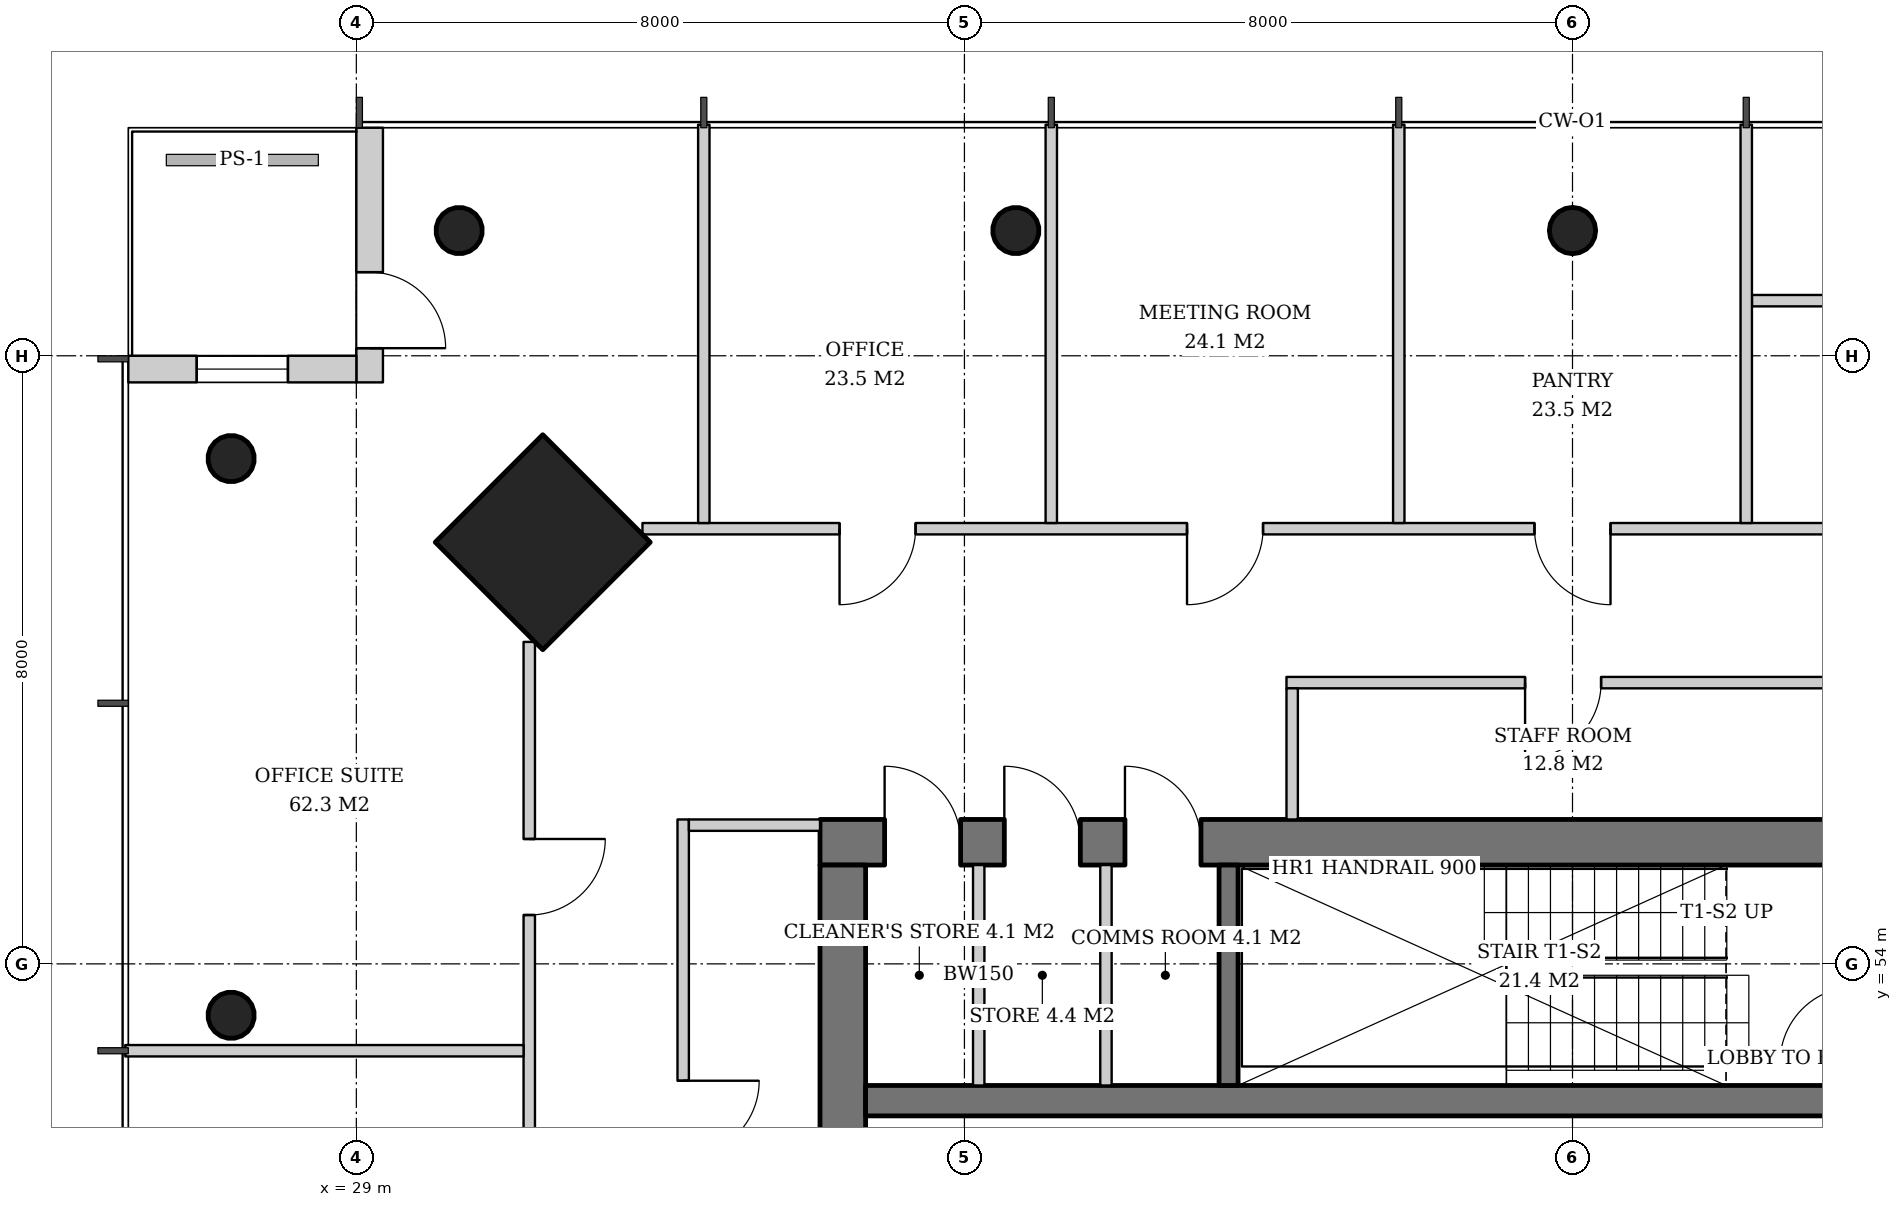
"""IFC4 building model, lengths in metres.
Left out: names, types, materials, properties, quantities, classifications, styles, units other than length and angle.
Written with IfcOpenShell. Run it as: python <this file> out.ifc"""

import sys

from ifc_helpers import new_model, si_unit, direction, frame, frame_2d, origin, origin_2d, place, context, subcontext, project, spatial, rectangle, hollow_circle, extrude, element, fill, save


model = new_model("IFC4")
c1 = context("Model", 3, precision=1e-05, world=origin(), true_north=direction((0.0, 1.0)))
c2 = subcontext(c1, "Body", "Model", "MODEL_VIEW")
j1 = project(units=[si_unit("LENGTHUNIT", "METRE"), si_unit("PLANEANGLEUNIT", "RADIAN")], contexts=[c1])
p1 = place(None, origin())
s1 = spatial("IfcSite", under=j1, at=p1, CompositionType="ELEMENT")
p2 = place(p1, origin())
s2 = spatial("IfcBuilding", under=s1, at=p2, CompositionType="ELEMENT")
p3 = place(p2, frame((0.0, 0.0, 218.6)))
s3 = spatial("IfcBuildingStorey", under=s2, at=p3, CompositionType="ELEMENT", Elevation=218.6)
p4 = place(p3, frame((31.414, 59.586, 0.0), z_axis=(0.031900153262, -0.031900153262, 0.998981861919), x_axis=(0.707106781187, 0.707106781187, 0.0)))
e1 = element("IfcColumn", 1, at=p4, inside=s3, PredefinedType="COLUMN", context=c2, shape_type="SweptSolid", body=[
    extrude(rectangle(XDim=2.0, YDim=2.0, at=origin_2d()), origin(), (0.0, 0.0, 1.0), 3.804),
])
p5 = place(p3, frame((30.314, 63.686, 0.0), z_axis=(0.031964207655, -0.031964207655, 0.998977766949), x_axis=(0.707106781187, 0.707106781187, 0.0)))
e2 = element("IfcColumn", 2, at=p5, inside=s3, PredefinedType="COLUMN", context=c2, shape_type="SweptSolid", body=[
    extrude(hollow_circle(Radius=0.305, WallThickness=0.025, at=origin_2d()), origin(), (0.0, 0.0, 1.0), 3.804),
])
p6 = place(p3, frame((45.0, 63.686, 0.0), z_axis=(0.0, -0.031980549263, 0.999488491414), x_axis=(1.0, 0.0, 0.0)))
e3 = element("IfcColumn", 3, at=p6, inside=s3, PredefinedType="COLUMN", context=c2, shape_type="SweptSolid", body=[
    extrude(hollow_circle(Radius=0.305, WallThickness=0.025, at=origin_2d()), origin(), (0.0, 0.0, 1.0), 3.802),
])
p7 = place(p3, frame((37.657, 63.686, 0.0), z_axis=(0.015924037308, -0.031976494272, 0.99936176075), x_axis=(0.895145027055, 0.445775033553, 0.0)))
e4 = element("IfcColumn", 4, at=p7, inside=s3, PredefinedType="COLUMN", context=c2, shape_type="SweptSolid", body=[
    extrude(hollow_circle(Radius=0.305, WallThickness=0.025, at=origin_2d()), origin(), (0.0, 0.0, 1.0), 3.802),
])
p8 = place(p3, frame((27.314, 60.686, 0.0), z_axis=(0.031964207655, -0.031964207655, 0.998977766949), x_axis=(0.707106781187, 0.707106781187, 0.0)))
e5 = element("IfcColumn", 5, at=p8, inside=s3, PredefinedType="COLUMN", context=c2, shape_type="SweptSolid", body=[
    extrude(hollow_circle(Radius=0.305, WallThickness=0.025, at=origin_2d()), origin(), (0.0, 0.0, 1.0), 3.804),
])
p9 = place(p3, frame((27.314, 53.343, 0.0), z_axis=(0.031976494272, -0.015924037308, 0.99936176075), x_axis=(0.445775033553, 0.895145027055, 0.0)))
e6 = element("IfcColumn", 6, at=p9, inside=s3, PredefinedType="COLUMN", context=c2, shape_type="SweptSolid", body=[
    extrude(hollow_circle(Radius=0.305, WallThickness=0.025, at=origin_2d()), origin(), (0.0, 0.0, 1.0), 3.802),
])
p10 = place(p3, frame((35.1, 55.6, 0.0), z_axis=(0.0, 0.0, 1.0), x_axis=(1.0, 0.0, 0.0)))
e7 = element("IfcWall", 7, at=p10, inside=s3, PredefinedType="SHEAR", context=c2, shape_type="SweptSolid", body=[
    extrude(rectangle(XDim=19.8, YDim=0.6, at=frame_2d((9.9, 0.0))), origin(), (0.0, 0.0, 1.0), 3.8),
])
p11 = place(p10, frame((14.54, 0.0, 0.0)))
e8 = element("IfcOpeningElement", 8, at=p11, cuts=e7, PredefinedType="OPENING", context=c2, shape_type="SweptSolid", body=[
    extrude(rectangle(XDim=1.0, YDim=2.1, at=frame_2d((0.5, 1.05))), frame((0.0, 0.31, 0.0), z_axis=(0.0, -1.0, 0.0), x_axis=(1.0, 0.0, 0.0)), (0.0, 0.0, 1.0), 0.62),
])
p12 = place(p10, frame((0.85, 0.0, 0.0)))
e9 = element("IfcOpeningElement", 9, at=p12, cuts=e7, PredefinedType="OPENING", context=c2, shape_type="SweptSolid", body=[
    extrude(rectangle(XDim=1.0, YDim=2.1, at=frame_2d((0.5, 1.05))), frame((0.0, 0.31, 0.0), z_axis=(0.0, -1.0, 0.0), x_axis=(1.0, 0.0, 0.0)), (0.0, 0.0, 1.0), 0.62),
])
p13 = place(p10, frame((2.425, 0.0, 0.0)))
e10 = element("IfcOpeningElement", 10, at=p13, cuts=e7, PredefinedType="OPENING", context=c2, shape_type="SweptSolid", body=[
    extrude(rectangle(XDim=1.0, YDim=2.1, at=frame_2d((0.5, 1.05))), frame((0.0, 0.31, 0.0), z_axis=(0.0, -1.0, 0.0), x_axis=(1.0, 0.0, 0.0)), (0.0, 0.0, 1.0), 0.62),
])
p14 = place(p10, frame((4.012, 0.0, 0.0)))
e11 = element("IfcOpeningElement", 11, at=p14, cuts=e7, PredefinedType="OPENING", context=c2, shape_type="SweptSolid", body=[
    extrude(rectangle(XDim=1.0, YDim=2.1, at=frame_2d((0.5, 1.05))), frame((0.0, 0.31, 0.0), z_axis=(0.0, -1.0, 0.0), x_axis=(1.0, 0.0, 0.0)), (0.0, 0.0, 1.0), 0.62),
])
p15 = place(p3, frame((35.4, 36.7, 0.0), z_axis=(0.0, 0.0, 1.0), x_axis=(0.0, 1.0, 0.0)))
e12 = element("IfcWall", 12, at=p15, inside=s3, PredefinedType="SHEAR", context=c2, shape_type="SweptSolid", body=[
    extrude(rectangle(XDim=18.6, YDim=0.6, at=frame_2d((9.3, 0.0))), origin(), (0.0, 0.0, 1.0), 3.8),
])
p16 = place(p15, frame((8.4, 0.0, 0.0)))
e13 = element("IfcOpeningElement", 13, at=p16, cuts=e12, PredefinedType="OPENING", context=c2, shape_type="SweptSolid", body=[
    extrude(rectangle(XDim=1.8, YDim=2.4, at=frame_2d((0.9, 1.2))), frame((0.0, 0.31, 0.0), z_axis=(0.0, -1.0, 0.0), x_axis=(1.0, 0.0, 0.0)), (0.0, 0.0, 1.0), 0.62),
])
p17 = place(p3, frame((35.7, 52.2, 0.0), z_axis=(0.0, 0.0, 1.0), x_axis=(1.0, 0.0, 0.0)))
e14 = element("IfcWall", 14, at=p17, inside=s3, PredefinedType="SHEAR", context=c2, shape_type="SweptSolid", body=[
    extrude(rectangle(XDim=18.6, YDim=0.4, at=frame_2d((9.3, 0.0))), origin(), (0.0, 0.0, 1.0), 3.8),
])
p18 = place(p3, frame((29.175, 65.0, 0.0), z_axis=(0.0, 0.0, 1.0), x_axis=(0.0, -1.0, 0.0)))
e15 = element("IfcWall", 15, at=p18, inside=s3, PredefinedType="SOLIDWALL", context=c2, shape_type="SweptSolid", body=[
    extrude(rectangle(XDim=3.35, YDim=0.35, at=frame_2d((1.675, 0.0))), origin(), (0.0, 0.0, 1.0), 3.62),
])
p19 = place(p18, frame((1.9, 0.0, 0.0)))
e16 = element("IfcOpeningElement", 16, at=p19, cuts=e15, PredefinedType="OPENING", context=c2, shape_type="SweptSolid", body=[
    extrude(rectangle(XDim=1.0, YDim=2.4, at=frame_2d((0.5, 1.2))), frame((0.0, 0.185, 0.0), z_axis=(0.0, -1.0, 0.0), x_axis=(1.0, 0.0, 0.0)), (0.0, 0.0, 1.0), 0.37),
])
p20 = place(p3, frame((29.0, 61.825, 0.0), z_axis=(0.0, 0.0, 1.0), x_axis=(-1.0, 0.0, 0.0)))
e17 = element("IfcWall", 17, at=p20, inside=s3, PredefinedType="SOLIDWALL", context=c2, shape_type="SweptSolid", body=[
    extrude(rectangle(XDim=3.0, YDim=0.35, at=frame_2d((1.5, 0.0))), origin(), (0.0, 0.0, 1.0), 3.62),
])
p21 = place(p20, frame((0.9, 0.0, 0.6)))
e18 = element("IfcOpeningElement", 18, at=p21, cuts=e17, PredefinedType="OPENING", context=c2, shape_type="SweptSolid", body=[
    extrude(rectangle(XDim=1.2, YDim=2.55, at=frame_2d((0.6, 1.275))), frame((0.0, 0.185, 0.0), z_axis=(0.0, -1.0, 0.0), x_axis=(1.0, 0.0, 0.0)), (0.0, 0.0, 1.0), 0.37),
])
p22 = place(p3, frame((40.475, 52.4, 0.0), z_axis=(0.0, 0.0, 1.0), x_axis=(0.0, 1.0, 0.0)))
e19 = element("IfcWall", 19, at=p22, inside=s3, PredefinedType="SHEAR", context=c2, shape_type="SweptSolid", body=[
    extrude(rectangle(XDim=2.9, YDim=0.25, at=frame_2d((1.45, 0.0))), origin(), (0.0, 0.0, 1.0), 3.8),
])
for number, where, z_axis, x_axis in (
    (20, (37.188, 52.4, 0.0), (0.0, 0.0, 1.0), (0.0, 1.0, 0.0)),
    (21, (38.862, 52.4, 0.0), (0.0, 0.0, 1.0), (0.0, 1.0, 0.0)),
):
    element("IfcWall", number, at=place(p3, frame(where, z_axis=z_axis, x_axis=x_axis)), inside=s3, PredefinedType="SOLIDWALL", context=c2, shape_type="SweptSolid", body=[
        extrude(rectangle(XDim=2.9, YDim=0.15, at=frame_2d((1.45, 0.0))), origin(), (0.0, 0.0, 1.0), 3.62),
    ])
p23 = place(p3, frame((48.515, 57.7, 0.0), z_axis=(0.0, 0.0, 1.0), x_axis=(-1.0, 0.0, 0.0)))
e22 = element("IfcWall", 22, at=p23, inside=s3, PredefinedType="PARTITIONING", context=c2, shape_type="SweptSolid", body=[
    extrude(rectangle(XDim=7.278, YDim=0.15, at=frame_2d((3.639, 0.0))), origin(), (0.0, 0.0, 1.0), 2.867),
])
p24 = place(p23, frame((3.139, 0.0, 0.0)))
e23 = element("IfcOpeningElement", 23, at=p24, cuts=e22, PredefinedType="OPENING", context=c2, shape_type="SweptSolid", body=[
    extrude(rectangle(XDim=1.0, YDim=2.1, at=frame_2d((0.5, 1.05))), frame((0.0, 0.085, 0.0), z_axis=(0.0, -1.0, 0.0), x_axis=(1.0, 0.0, 0.0)), (0.0, 0.0, 1.0), 0.17),
])
p25 = place(p3, frame((41.312, 55.9, 0.0), z_axis=(0.0, 0.0, 1.0), x_axis=(0.0, 1.0, 0.0)))
e24 = element("IfcWall", 24, at=p25, inside=s3, PredefinedType="PARTITIONING", context=c2, shape_type="SweptSolid", body=[
    extrude(rectangle(XDim=1.725, YDim=0.15, at=frame_2d((0.863, 0.0))), origin(), (0.0, 0.0, 1.0), 3.62),
])
p26 = place(p3, frame((33.3, 55.9, 0.0), z_axis=(0.0, 0.0, 1.0), x_axis=(0.0, -1.0, 0.0)))
e25 = element("IfcWall", 25, at=p26, inside=s3, PredefinedType="PARTITIONING", context=c2, shape_type="SweptSolid", body=[
    extrude(rectangle(XDim=7.875, YDim=0.15, at=frame_2d((3.938, 0.0))), origin(), (0.0, 0.0, 1.0), 2.867),
])
p27 = place(p26, frame((3.438, 0.0, 0.0)))
e26 = element("IfcOpeningElement", 26, at=p27, cuts=e25, PredefinedType="OPENING", context=c2, shape_type="SweptSolid", body=[
    extrude(rectangle(XDim=1.0, YDim=2.1, at=frame_2d((0.5, 1.05))), frame((0.0, 0.085, 0.0), z_axis=(0.0, -1.0, 0.0), x_axis=(1.0, 0.0, 0.0)), (0.0, 0.0, 1.0), 0.17),
])
p28 = place(p3, frame((35.1, 55.825, 0.0), z_axis=(0.0, 0.0, 1.0), x_axis=(-1.0, 0.0, 0.0)))
e27 = element("IfcWall", 27, at=p28, inside=s3, PredefinedType="PARTITIONING", context=c2, shape_type="SweptSolid", body=[
    extrude(rectangle(XDim=1.725, YDim=0.15, at=frame_2d((0.863, 0.0))), origin(), (0.0, 0.0, 1.0), 2.92),
])
p29 = place(p3, frame((51.782, 62.725, 0.0), z_axis=(0.0, 0.0, 1.0), x_axis=(-1.0, 0.0, 0.0)))
e28 = element("IfcWall", 28, at=p29, inside=s3, PredefinedType="PARTITIONING", context=c2, shape_type="SweptSolid", body=[
    extrude(rectangle(XDim=4.422, YDim=0.15, at=frame_2d((2.211, 0.0))), origin(), (0.0, 0.0, 1.0), 2.867),
])
p30 = place(p3, frame((57.236, 59.725, 0.0), z_axis=(0.0, 0.0, 1.0), x_axis=(-1.0, 0.0, 0.0)))
e29 = element("IfcWall", 29, at=p30, inside=s3, PredefinedType="PARTITIONING", context=c2, shape_type="SweptSolid", body=[
    extrude(rectangle(XDim=24.472, YDim=0.15, at=frame_2d((12.236, 0.0))), origin(), (0.0, 0.0, 1.0), 2.867),
])
p31 = place(p30, frame((2.593, 0.0, 0.0)))
e30 = element("IfcOpeningElement", 30, at=p31, cuts=e29, PredefinedType="OPENING", context=c2, shape_type="SweptSolid", body=[
    extrude(rectangle(XDim=1.0, YDim=2.1, at=frame_2d((0.5, 1.05))), frame((0.0, 0.085, 0.0), z_axis=(0.0, -1.0, 0.0), x_axis=(1.0, 0.0, 0.0)), (0.0, 0.0, 1.0), 0.17),
])
p32 = place(p30, frame((7.164, 0.0, 0.0)))
e31 = element("IfcOpeningElement", 31, at=p32, cuts=e29, PredefinedType="OPENING", context=c2, shape_type="SweptSolid", body=[
    extrude(rectangle(XDim=1.0, YDim=2.1, at=frame_2d((0.5, 1.05))), frame((0.0, 0.085, 0.0), z_axis=(0.0, -1.0, 0.0), x_axis=(1.0, 0.0, 0.0)), (0.0, 0.0, 1.0), 0.17),
])
p33 = place(p30, frame((11.736, 0.0, 0.0)))
e32 = element("IfcOpeningElement", 32, at=p33, cuts=e29, PredefinedType="OPENING", context=c2, shape_type="SweptSolid", body=[
    extrude(rectangle(XDim=1.0, YDim=2.1, at=frame_2d((0.5, 1.05))), frame((0.0, 0.085, 0.0), z_axis=(0.0, -1.0, 0.0), x_axis=(1.0, 0.0, 0.0)), (0.0, 0.0, 1.0), 0.17),
])
p34 = place(p30, frame((16.307, 0.0, 0.0)))
e33 = element("IfcOpeningElement", 33, at=p34, cuts=e29, PredefinedType="OPENING", context=c2, shape_type="SweptSolid", body=[
    extrude(rectangle(XDim=1.0, YDim=2.1, at=frame_2d((0.5, 1.05))), frame((0.0, 0.085, 0.0), z_axis=(0.0, -1.0, 0.0), x_axis=(1.0, 0.0, 0.0)), (0.0, 0.0, 1.0), 0.17),
])
p35 = place(p30, frame((20.879, 0.0, 0.0)))
e34 = element("IfcOpeningElement", 34, at=p35, cuts=e29, PredefinedType="OPENING", context=c2, shape_type="SweptSolid", body=[
    extrude(rectangle(XDim=1.0, YDim=2.1, at=frame_2d((0.5, 1.05))), frame((0.0, 0.085, 0.0), z_axis=(0.0, -1.0, 0.0), x_axis=(1.0, 0.0, 0.0)), (0.0, 0.0, 1.0), 0.17),
])
for number, where, z_axis, x_axis in (
    (35, (47.286, 59.8, 0.0), (0.0, 0.0, 1.0), (0.0, 1.0, 0.0)),
    (36, (42.714, 59.8, 0.0), (0.0, 0.0, 1.0), (0.0, 1.0, 0.0)),
    (37, (38.143, 59.8, 0.0), (0.0, 0.0, 1.0), (0.0, 1.0, 0.0)),
    (38, (33.572, 59.8, 0.0), (0.0, 0.0, 1.0), (0.0, 1.0, 0.0)),
):
    element("IfcWall", number, at=place(p3, frame(where, z_axis=z_axis, x_axis=x_axis)), inside=s3, PredefinedType="PARTITIONING", context=c2, shape_type="SweptSolid", body=[
        extrude(rectangle(XDim=5.24, YDim=0.15, at=frame_2d((2.62, 0.0))), origin(), (0.0, 0.0, 1.0), 3.12),
    ])
p36 = place(p3, frame((31.275, 58.236, 0.0), z_axis=(0.0, 0.0, 1.0), x_axis=(0.0, -1.0, 0.0)))
e39 = element("IfcWall", 39, at=p36, inside=s3, PredefinedType="PARTITIONING", context=c2, shape_type="SweptSolid", body=[
    extrude(rectangle(XDim=24.472, YDim=0.15, at=frame_2d((12.236, 0.0))), origin(), (0.0, 0.0, 1.0), 2.867),
])
p37 = place(p36, frame((2.593, 0.0, 0.0)))
e40 = element("IfcOpeningElement", 40, at=p37, cuts=e39, PredefinedType="OPENING", context=c2, shape_type="SweptSolid", body=[
    extrude(rectangle(XDim=1.0, YDim=2.1, at=frame_2d((0.5, 1.05))), frame((0.0, 0.085, 0.0), z_axis=(0.0, -1.0, 0.0), x_axis=(1.0, 0.0, 0.0)), (0.0, 0.0, 1.0), 0.17),
])
p38 = place(p36, frame((7.164, 0.0, 0.0)))
e41 = element("IfcOpeningElement", 41, at=p38, cuts=e39, PredefinedType="OPENING", context=c2, shape_type="SweptSolid", body=[
    extrude(rectangle(XDim=1.0, YDim=2.1, at=frame_2d((0.5, 1.05))), frame((0.0, 0.085, 0.0), z_axis=(0.0, -1.0, 0.0), x_axis=(1.0, 0.0, 0.0)), (0.0, 0.0, 1.0), 0.17),
])
p39 = place(p36, frame((11.836, 0.0, 0.0)))
e42 = element("IfcOpeningElement", 42, at=p39, cuts=e39, PredefinedType="OPENING", context=c2, shape_type="SweptSolid", body=[
    extrude(rectangle(XDim=0.8, YDim=2.1, at=frame_2d((0.4, 1.05))), frame((0.0, 0.085, 0.0), z_axis=(0.0, -1.0, 0.0), x_axis=(1.0, 0.0, 0.0)), (0.0, 0.0, 1.0), 0.17),
])
p40 = place(p36, frame((16.307, 0.0, 0.0)))
e43 = element("IfcOpeningElement", 43, at=p40, cuts=e39, PredefinedType="OPENING", context=c2, shape_type="SweptSolid", body=[
    extrude(rectangle(XDim=1.0, YDim=2.1, at=frame_2d((0.5, 1.05))), frame((0.0, 0.085, 0.0), z_axis=(0.0, -1.0, 0.0), x_axis=(1.0, 0.0, 0.0)), (0.0, 0.0, 1.0), 0.17),
])
p41 = place(p36, frame((20.979, 0.0, 0.0)))
e44 = element("IfcOpeningElement", 44, at=p41, cuts=e39, PredefinedType="OPENING", context=c2, shape_type="SweptSolid", body=[
    extrude(rectangle(XDim=0.8, YDim=2.1, at=frame_2d((0.4, 1.05))), frame((0.0, 0.085, 0.0), z_axis=(0.0, -1.0, 0.0), x_axis=(1.0, 0.0, 0.0)), (0.0, 0.0, 1.0), 0.17),
])
p42 = place(p3, frame((31.2, 52.857, 0.0), z_axis=(0.0, 0.0, 1.0), x_axis=(-1.0, 0.0, 0.0)))
e45 = element("IfcWall", 45, at=p42, inside=s3, PredefinedType="PARTITIONING", context=c2, shape_type="SweptSolid", body=[
    extrude(rectangle(XDim=5.24, YDim=0.15, at=frame_2d((2.62, 0.0))), origin(), (0.0, 0.0, 1.0), 3.12),
])
p43 = place(p19, origin())
e46 = element("IfcDoor", 46, at=p43, inside=s3, OperationType="SINGLE_SWING_RIGHT", PredefinedType="DOOR", context=c2, shape_type="SweptSolid", body=[
    extrude(rectangle(XDim=1.0, YDim=2.4, at=frame_2d((0.5, 1.2))), frame((0.0, 0.025, 0.0), z_axis=(0.0, -1.0, 0.0), x_axis=(1.0, 0.0, 0.0)), (0.0, 0.0, 1.0), 0.05),
])
fill(e16, e46)
p44 = place(p21, origin())
e47 = element("IfcWindow", 47, at=p44, inside=s3, PartitioningType="SINGLE_PANEL", PredefinedType="WINDOW", context=c2, shape_type="SweptSolid", body=[
    extrude(rectangle(XDim=1.2, YDim=2.55, at=frame_2d((0.6, 1.275))), frame((0.0, 0.03, 0.0), z_axis=(0.0, -1.0, 0.0), x_axis=(1.0, 0.0, 0.0)), (0.0, 0.0, 1.0), 0.06),
])
fill(e18, e47)
p45 = place(p12, origin())
e48 = element("IfcDoor", 48, at=p45, inside=s3, OperationType="SINGLE_SWING_LEFT", PredefinedType="DOOR", context=c2, shape_type="SweptSolid", body=[
    extrude(rectangle(XDim=1.0, YDim=2.1, at=frame_2d((0.5, 1.05))), frame((0.0, -0.24, 0.0), z_axis=(0.0, -1.0, 0.0), x_axis=(1.0, 0.0, 0.0)), (0.0, 0.0, 1.0), 0.05),
])
fill(e9, e48)
p46 = place(p13, origin())
e49 = element("IfcDoor", 49, at=p46, inside=s3, OperationType="SINGLE_SWING_LEFT", PredefinedType="DOOR", context=c2, shape_type="SweptSolid", body=[
    extrude(rectangle(XDim=1.0, YDim=2.1, at=frame_2d((0.5, 1.05))), frame((0.0, -0.24, 0.0), z_axis=(0.0, -1.0, 0.0), x_axis=(1.0, 0.0, 0.0)), (0.0, 0.0, 1.0), 0.05),
])
fill(e10, e49)
p47 = place(p14, origin())
e50 = element("IfcDoor", 50, at=p47, inside=s3, OperationType="SINGLE_SWING_LEFT", PredefinedType="DOOR", context=c2, shape_type="SweptSolid", body=[
    extrude(rectangle(XDim=1.0, YDim=2.1, at=frame_2d((0.5, 1.05))), frame((0.0, -0.24, 0.0), z_axis=(0.0, -1.0, 0.0), x_axis=(1.0, 0.0, 0.0)), (0.0, 0.0, 1.0), 0.05),
])
fill(e11, e50)
p48 = place(p24, origin())
e51 = element("IfcDoor", 51, at=p48, inside=s3, OperationType="SINGLE_SWING_RIGHT", PredefinedType="DOOR", context=c2, shape_type="SweptSolid", body=[
    extrude(rectangle(XDim=1.0, YDim=2.1, at=frame_2d((0.5, 1.05))), frame((0.0, 0.025, 0.0), z_axis=(0.0, -1.0, 0.0), x_axis=(1.0, 0.0, 0.0)), (0.0, 0.0, 1.0), 0.05),
])
fill(e23, e51)
p49 = place(p27, origin())
e52 = element("IfcDoor", 52, at=p49, inside=s3, OperationType="SINGLE_SWING_LEFT", PredefinedType="DOOR", context=c2, shape_type="SweptSolid", body=[
    extrude(rectangle(XDim=1.0, YDim=2.1, at=frame_2d((0.5, 1.05))), frame((0.0, 0.025, 0.0), z_axis=(0.0, -1.0, 0.0), x_axis=(1.0, 0.0, 0.0)), (0.0, 0.0, 1.0), 0.05),
])
fill(e26, e52)
p50 = place(p33, origin())
e53 = element("IfcDoor", 53, at=p50, inside=s3, OperationType="SINGLE_SWING_LEFT", PredefinedType="DOOR", context=c2, shape_type="SweptSolid", body=[
    extrude(rectangle(XDim=1.0, YDim=2.1, at=frame_2d((0.5, 1.05))), frame((0.0, 0.025, 0.0), z_axis=(0.0, -1.0, 0.0), x_axis=(1.0, 0.0, 0.0)), (0.0, 0.0, 1.0), 0.05),
])
fill(e32, e53)
p51 = place(p34, origin())
e54 = element("IfcDoor", 54, at=p51, inside=s3, OperationType="SINGLE_SWING_RIGHT", PredefinedType="DOOR", context=c2, shape_type="SweptSolid", body=[
    extrude(rectangle(XDim=1.0, YDim=2.1, at=frame_2d((0.5, 1.05))), frame((0.0, 0.025, 0.0), z_axis=(0.0, -1.0, 0.0), x_axis=(1.0, 0.0, 0.0)), (0.0, 0.0, 1.0), 0.05),
])
fill(e33, e54)
p52 = place(p35, origin())
e55 = element("IfcDoor", 55, at=p52, inside=s3, OperationType="SINGLE_SWING_RIGHT", PredefinedType="DOOR", context=c2, shape_type="SweptSolid", body=[
    extrude(rectangle(XDim=1.0, YDim=2.1, at=frame_2d((0.5, 1.05))), frame((0.0, 0.025, 0.0), z_axis=(0.0, -1.0, 0.0), x_axis=(1.0, 0.0, 0.0)), (0.0, 0.0, 1.0), 0.05),
])
fill(e34, e55)
p53 = place(p37, origin())
e56 = element("IfcDoor", 56, at=p53, inside=s3, OperationType="SINGLE_SWING_LEFT", PredefinedType="DOOR", context=c2, shape_type="SweptSolid", body=[
    extrude(rectangle(XDim=1.0, YDim=2.1, at=frame_2d((0.5, 1.05))), frame((0.0, 0.025, 0.0), z_axis=(0.0, -1.0, 0.0), x_axis=(1.0, 0.0, 0.0)), (0.0, 0.0, 1.0), 0.05),
])
fill(e40, e56)
save(model, sys.argv[1])
